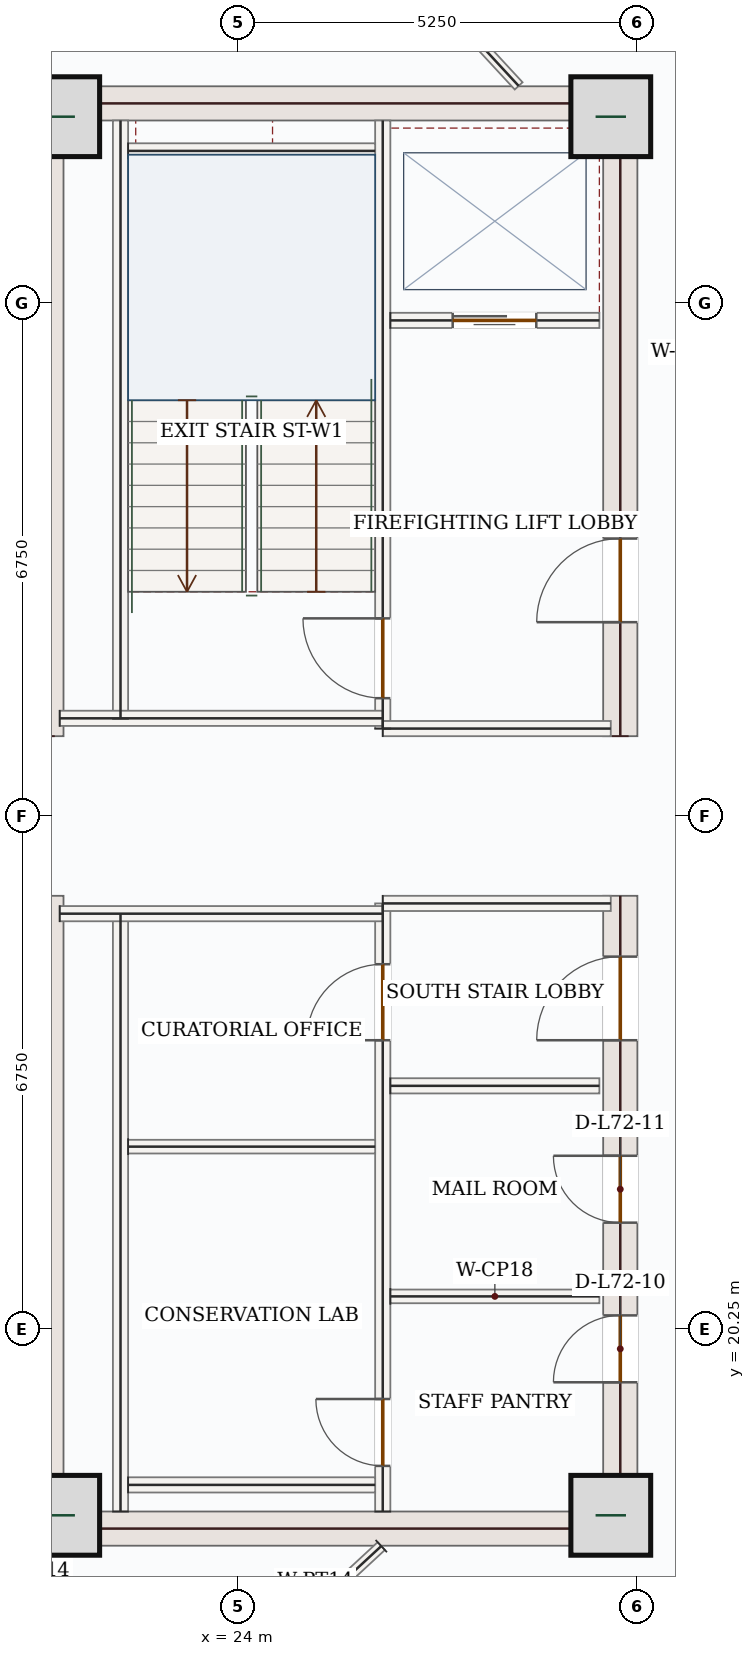
"""IFC4 building model, lengths in metres.
Left out: names, types, materials, properties, quantities, classifications, styles, units other than length and angle.
Written with IfcOpenShell. Run it as: python <this file> out.ifc"""

import sys

from ifc_helpers import new_model, si_unit, direction, frame, frame_2d, origin, origin_2d, place, context, subcontext, project, spatial, rectangle, extrude, source, transform, mapped, element, fill, save


model = new_model("IFC4")
c1 = context("Model", 3, precision=1e-05, world=origin(), true_north=direction((0.0, 1.0)))
c2 = subcontext(c1, "Body", "Model", "MODEL_VIEW")
j1 = project(units=[si_unit("LENGTHUNIT", "METRE"), si_unit("PLANEANGLEUNIT", "RADIAN")], contexts=[c1])
p1 = place(None, origin())
s1 = spatial("IfcSite", under=j1, at=p1, CompositionType="ELEMENT")
p2 = place(p1, origin())
s2 = spatial("IfcBuilding", under=s1, at=p2, CompositionType="ELEMENT")
p3 = place(p2, frame((0.0, 0.0, 299.1)))
s3 = spatial("IfcBuildingStorey", under=s2, at=p3, CompositionType="ELEMENT", Elevation=299.1)
m1 = source(origin(), c2, "Body", "SweptSolid", [
    extrude(rectangle(XDim=8.55, YDim=0.45, at=frame_2d((4.275, 0.0))), origin(), (0.0, 0.0, 1.0), 3.5),
])
for number, where, z_axis, x_axis in (
    (1, (21.475, 17.4, 0.0), (0.0, 0.0, 1.0), (0.0, 1.0, 0.0)),
    (2, (21.475, 28.05, 0.0), (0.0, 0.0, 1.0), (0.0, 1.0, 0.0)),
):
    element("IfcWall", number, at=place(p3, frame(where, z_axis=z_axis, x_axis=x_axis)), inside=s3, PredefinedType="SHEAR", context=c2, shape_type="MappedRepresentation", body=[
        mapped(m1, transform((0.0, 0.0, 0.0), x_axis=(1.0, 0.0, 0.0), y_axis=(0.0, 1.0, 0.0), z_axis=(0.0, 0.0, 1.0), scale=1.0)),
    ])
p4 = place(p3, frame((29.025, 17.4, 0.0), z_axis=(0.0, 0.0, 1.0), x_axis=(0.0, 1.0, 0.0)))
e3 = element("IfcWall", 3, at=p4, inside=s3, PredefinedType="SHEAR", context=c2, shape_type="SweptSolid", body=[
    extrude(rectangle(XDim=8.55, YDim=0.45, at=frame_2d((4.275, 0.0))), origin(), (0.0, 0.0, 1.0), 3.5),
])
p5 = place(p4, frame((6.65, 0.0, 0.0)))
e4 = element("IfcOpeningElement", 4, at=p5, cuts=e3, PredefinedType="OPENING", context=c2, shape_type="SweptSolid", body=[
    extrude(rectangle(XDim=1.1, YDim=2.2, at=frame_2d((0.55, 1.1))), frame((0.0, 0.235, 0.0), z_axis=(0.0, -1.0, 0.0), x_axis=(1.0, 0.0, 0.0)), (0.0, 0.0, 1.0), 0.47),
])
p6 = place(p4, frame((2.15, 0.0, 0.0)))
e5 = element("IfcOpeningElement", 5, at=p6, cuts=e3, PredefinedType="OPENING", context=c2, shape_type="SweptSolid", body=[
    extrude(rectangle(XDim=0.88, YDim=2.1, at=frame_2d((0.44, 1.05))), frame((0.0, 0.235, 0.0), z_axis=(0.0, -1.0, 0.0), x_axis=(1.0, 0.0, 0.0)), (0.0, 0.0, 1.0), 0.47),
])
p7 = place(p4, frame((4.25, 0.0, 0.0)))
e6 = element("IfcOpeningElement", 6, at=p7, cuts=e3, PredefinedType="OPENING", context=c2, shape_type="SweptSolid", body=[
    extrude(rectangle(XDim=0.88, YDim=2.1, at=frame_2d((0.44, 1.05))), frame((0.0, 0.235, 0.0), z_axis=(0.0, -1.0, 0.0), x_axis=(1.0, 0.0, 0.0)), (0.0, 0.0, 1.0), 0.47),
])
p8 = place(p3, frame((29.025, 28.05, 0.0), z_axis=(0.0, 0.0, 1.0), x_axis=(0.0, 1.0, 0.0)))
e7 = element("IfcWall", 7, at=p8, inside=s3, PredefinedType="SHEAR", context=c2, shape_type="SweptSolid", body=[
    extrude(rectangle(XDim=8.55, YDim=0.45, at=frame_2d((4.275, 0.0))), origin(), (0.0, 0.0, 1.0), 3.5),
])
p9 = place(p8, frame((1.5, 0.0, 0.0)))
e8 = element("IfcOpeningElement", 8, at=p9, cuts=e7, PredefinedType="OPENING", context=c2, shape_type="SweptSolid", body=[
    extrude(rectangle(XDim=1.1, YDim=2.2, at=frame_2d((0.55, 1.1))), frame((0.0, 0.235, 0.0), z_axis=(0.0, -1.0, 0.0), x_axis=(1.0, 0.0, 0.0)), (0.0, 0.0, 1.0), 0.47),
])
m2 = source(origin(), c2, "Body", "SweptSolid", [
    extrude(rectangle(XDim=7.1, YDim=0.45, at=frame_2d((3.55, 0.0))), origin(), (0.0, 0.0, 1.0), 3.5),
])
for number, where, z_axis, x_axis in (
    (9, (21.7, 17.625, 0.0), (0.0, 0.0, 1.0), (1.0, 0.0, 0.0)),
    (10, (21.7, 36.375, 0.0), (0.0, 0.0, 1.0), (1.0, 0.0, 0.0)),
):
    element("IfcWall", number, at=place(p3, frame(where, z_axis=z_axis, x_axis=x_axis)), inside=s3, PredefinedType="SHEAR", context=c2, shape_type="MappedRepresentation", body=[
        mapped(m2, transform((0.0, 0.0, 0.0), x_axis=(1.0, 0.0, 0.0), y_axis=(0.0, 1.0, 0.0), z_axis=(0.0, 0.0, 1.0), scale=1.0)),
    ])
m3 = source(origin(), c2, "Body", "SweptSolid", [
    extrude(rectangle(XDim=1.05, YDim=1.05, at=origin_2d()), origin(), (0.0, 0.0, 1.0), 3.75),
])
for number, where, z_axis, x_axis in (
    (11, (21.65, 17.8, 0.0), (0.0, 0.0, 1.0), (1.0, 0.0, 0.0)),
    (12, (28.9, 17.8, 0.0), (0.0, 0.0, 1.0), (1.0, 0.0, 0.0)),
    (13, (21.65, 36.2, 0.0), (0.0, 0.0, 1.0), (1.0, 0.0, 0.0)),
    (14, (28.9, 36.2, 0.0), (0.0, 0.0, 1.0), (1.0, 0.0, 0.0)),
):
    element("IfcColumn", number, at=place(p3, frame(where, z_axis=z_axis, x_axis=x_axis)), inside=s3, PredefinedType="COLUMN", context=c2, shape_type="MappedRepresentation", body=[
        mapped(m3, transform((0.0, 0.0, 0.0), x_axis=(1.0, 0.0, 0.0), y_axis=(0.0, 1.0, 0.0), z_axis=(0.0, 0.0, 1.0), scale=1.0)),
    ])
m4 = source(origin(), c2, "Body", "SweptSolid", [
    extrude(rectangle(XDim=10.274, YDim=0.28, at=frame_2d((5.137, 0.0))), origin(), (0.0, 0.0, 1.0), 3.5),
])
p10 = place(p3, frame((25.992, 10.987, 0.0), z_axis=(0.0, 0.0, 1.0), x_axis=(-0.68643580465, 0.727190405667, 0.0)))
e15 = element("IfcWall", 15, at=p10, inside=s3, PredefinedType="SOLIDWALL", context=c2, shape_type="MappedRepresentation", body=[
    mapped(m4, transform((0.0, 0.0, 0.0), x_axis=(1.0, 0.0, 0.0), y_axis=(0.0, 1.0, 0.0), z_axis=(0.0, 0.0, 1.0), scale=1.0)),
])
p11 = place(p3, frame((18.94, 35.542, 0.0), z_axis=(0.0, 0.0, 1.0), x_axis=(0.712557502542, 0.701613715353, 0.0)))
e16 = element("IfcWall", 16, at=p11, inside=s3, PredefinedType="SOLIDWALL", context=c2, shape_type="SweptSolid", body=[
    extrude(rectangle(XDim=11.69, YDim=0.28, at=frame_2d((5.845, 0.0))), origin(), (0.0, 0.0, 1.0), 3.5),
])
p12 = place(p11, frame((5.095, 0.0, 0.85)))
e17 = element("IfcOpeningElement", 17, at=p12, cuts=e16, PredefinedType="OPENING", context=c2, shape_type="SweptSolid", body=[
    extrude(rectangle(XDim=1.5, YDim=1.5, at=frame_2d((0.75, 0.75))), frame((0.0, 0.15, 0.0), z_axis=(0.0, -1.0, 0.0), x_axis=(1.0, 0.0, 0.0)), (0.0, 0.0, 1.0), 0.3),
])
m5 = source(origin(), c2, "Body", "SweptSolid", [
    extrude(rectangle(XDim=7.87, YDim=0.2, at=frame_2d((3.935, 0.0))), origin(), (0.0, 0.0, 1.0), 3.5),
])
for number, where, z_axis, x_axis in (
    (18, (22.45, 17.85, 0.0), (0.0, 0.0, 1.0), (0.0, 1.0, 0.0)),
    (19, (22.45, 28.28, 0.0), (0.0, 0.0, 1.0), (0.0, 1.0, 0.0)),
):
    element("IfcWall", number, at=place(p3, frame(where, z_axis=z_axis, x_axis=x_axis)), inside=s3, PredefinedType="SOLIDWALL", context=c2, shape_type="MappedRepresentation", body=[
        mapped(m5, transform((0.0, 0.0, 0.0), x_axis=(1.0, 0.0, 0.0), y_axis=(0.0, 1.0, 0.0), z_axis=(0.0, 0.0, 1.0), scale=1.0)),
    ])
p13 = place(p3, frame((25.9, 17.85, 0.0), z_axis=(0.0, 0.0, 1.0), x_axis=(0.0, 1.0, 0.0)))
e20 = element("IfcWall", 20, at=p13, inside=s3, PredefinedType="SOLIDWALL", context=c2, shape_type="SweptSolid", body=[
    extrude(rectangle(XDim=8.0, YDim=0.2, at=frame_2d((4.0, 0.0))), origin(), (0.0, 0.0, 1.0), 3.5),
])
p14 = place(p13, frame((6.2, 0.0, 0.0)))
e21 = element("IfcOpeningElement", 21, at=p14, cuts=e20, PredefinedType="OPENING", context=c2, shape_type="SweptSolid", body=[
    extrude(rectangle(XDim=1.0, YDim=2.15, at=frame_2d((0.5, 1.075))), frame((0.0, 0.11, 0.0), z_axis=(0.0, -1.0, 0.0), x_axis=(1.0, 0.0, 0.0)), (0.0, 0.0, 1.0), 0.22),
])
p15 = place(p13, frame((0.6, 0.0, 0.0)))
e22 = element("IfcOpeningElement", 22, at=p15, cuts=e20, PredefinedType="OPENING", context=c2, shape_type="SweptSolid", body=[
    extrude(rectangle(XDim=0.88, YDim=2.1, at=frame_2d((0.44, 1.05))), frame((0.0, 0.11, 0.0), z_axis=(0.0, -1.0, 0.0), x_axis=(1.0, 0.0, 0.0)), (0.0, 0.0, 1.0), 0.22),
])
p16 = place(p3, frame((25.9, 28.15, 0.0), z_axis=(0.0, 0.0, 1.0), x_axis=(0.0, 1.0, 0.0)))
e23 = element("IfcWall", 23, at=p16, inside=s3, PredefinedType="SOLIDWALL", context=c2, shape_type="SweptSolid", body=[
    extrude(rectangle(XDim=8.0, YDim=0.2, at=frame_2d((4.0, 0.0))), origin(), (0.0, 0.0, 1.0), 3.5),
])
p17 = place(p16, frame((0.4, 0.0, 0.0)))
e24 = element("IfcOpeningElement", 24, at=p17, cuts=e23, PredefinedType="OPENING", context=c2, shape_type="SweptSolid", body=[
    extrude(rectangle(XDim=1.05, YDim=2.15, at=frame_2d((0.525, 1.075))), frame((0.0, 0.11, 0.0), z_axis=(0.0, -1.0, 0.0), x_axis=(1.0, 0.0, 0.0)), (0.0, 0.0, 1.0), 0.22),
])
m6 = source(origin(), c2, "Body", "SweptSolid", [
    extrude(rectangle(XDim=4.25, YDim=0.2, at=frame_2d((2.125, 0.0))), origin(), (0.0, 0.0, 1.0), 3.5),
])
p18 = place(p3, frame((21.65, 25.715, 0.0), z_axis=(0.0, 0.0, 1.0), x_axis=(1.0, 0.0, 0.0)))
e25 = element("IfcWall", 25, at=p18, inside=s3, PredefinedType="SOLIDWALL", context=c2, shape_type="MappedRepresentation", body=[
    mapped(m6, transform((0.0, 0.0, 0.0), x_axis=(1.0, 0.0, 0.0), y_axis=(0.0, 1.0, 0.0), z_axis=(0.0, 0.0, 1.0), scale=1.0)),
])
m7 = source(origin(), c2, "Body", "SweptSolid", [
    extrude(rectangle(XDim=3.0, YDim=0.2, at=frame_2d((1.5, 0.0))), origin(), (0.0, 0.0, 1.0), 3.5),
])
p19 = place(p3, frame((25.9, 25.85, 0.0), z_axis=(0.0, 0.0, 1.0), x_axis=(1.0, 0.0, 0.0)))
e26 = element("IfcWall", 26, at=p19, inside=s3, PredefinedType="SOLIDWALL", context=c2, shape_type="MappedRepresentation", body=[
    mapped(m7, transform((0.0, 0.0, 0.0), x_axis=(1.0, 0.0, 0.0), y_axis=(0.0, 1.0, 0.0), z_axis=(0.0, 0.0, 1.0), scale=1.0)),
])
p20 = place(p3, frame((21.65, 28.285, 0.0), z_axis=(0.0, 0.0, 1.0), x_axis=(1.0, 0.0, 0.0)))
e27 = element("IfcWall", 27, at=p20, inside=s3, PredefinedType="SOLIDWALL", context=c2, shape_type="MappedRepresentation", body=[
    mapped(m6, transform((0.0, 0.0, 0.0), x_axis=(1.0, 0.0, 0.0), y_axis=(0.0, 1.0, 0.0), z_axis=(0.0, 0.0, 1.0), scale=1.0)),
])
p21 = place(p3, frame((25.9, 28.15, 0.0), z_axis=(0.0, 0.0, 1.0), x_axis=(1.0, 0.0, 0.0)))
e28 = element("IfcWall", 28, at=p21, inside=s3, PredefinedType="SOLIDWALL", context=c2, shape_type="MappedRepresentation", body=[
    mapped(m7, transform((0.0, 0.0, 0.0), x_axis=(1.0, 0.0, 0.0), y_axis=(0.0, 1.0, 0.0), z_axis=(0.0, 0.0, 1.0), scale=1.0)),
])
m8 = source(origin(), c2, "Body", "SweptSolid", [
    extrude(rectangle(XDim=3.25, YDim=0.2, at=frame_2d((1.625, 0.0))), origin(), (0.0, 0.0, 1.0), 3.5),
])
for number, where, z_axis, x_axis in (
    (29, (22.55, 35.75, 0.0), (0.0, 0.0, 1.0), (1.0, 0.0, 0.0)),
    (30, (22.55, 18.2, 0.0), (0.0, 0.0, 1.0), (1.0, 0.0, 0.0)),
):
    element("IfcWall", number, at=place(p3, frame(where, z_axis=z_axis, x_axis=x_axis)), inside=s3, PredefinedType="SOLIDWALL", context=c2, shape_type="MappedRepresentation", body=[
        mapped(m8, transform((0.0, 0.0, 0.0), x_axis=(1.0, 0.0, 0.0), y_axis=(0.0, 1.0, 0.0), z_axis=(0.0, 0.0, 1.0), scale=1.0)),
    ])
m9 = source(origin(), c2, "Body", "SweptSolid", [
    extrude(rectangle(XDim=3.25, YDim=0.18, at=frame_2d((1.625, 0.0))), origin(), (0.0, 0.0, 1.0), 3.5),
])
p22 = place(p3, frame((22.55, 22.65, 0.0), z_axis=(0.0, 0.0, 1.0), x_axis=(1.0, 0.0, 0.0)))
e31 = element("IfcWall", 31, at=p22, inside=s3, PredefinedType="PARTITIONING", context=c2, shape_type="MappedRepresentation", body=[
    mapped(m9, transform((0.0, 0.0, 0.0), x_axis=(1.0, 0.0, 0.0), y_axis=(0.0, 1.0, 0.0), z_axis=(0.0, 0.0, 1.0), scale=1.0)),
])
p23 = place(p3, frame((26.0, 33.52, 0.0), z_axis=(0.0, 0.0, 1.0), x_axis=(1.0, 0.0, 0.0)))
e32 = element("IfcWall", 32, at=p23, inside=s3, PredefinedType="SOLIDWALL", context=c2, shape_type="SweptSolid", body=[
    extrude(rectangle(XDim=2.75, YDim=0.2, at=frame_2d((1.375, 0.0))), origin(), (0.0, 0.0, 1.0), 3.5),
])
p24 = place(p23, frame((0.82, 0.0, 0.0)))
e33 = element("IfcOpeningElement", 33, at=p24, cuts=e32, PredefinedType="OPENING", context=c2, shape_type="SweptSolid", body=[
    extrude(rectangle(XDim=1.1, YDim=2.15, at=frame_2d((0.55, 1.075))), frame((0.0, 0.11, 0.0), z_axis=(0.0, -1.0, 0.0), x_axis=(1.0, 0.0, 0.0)), (0.0, 0.0, 1.0), 0.22),
])
m10 = source(origin(), c2, "Body", "SweptSolid", [
    extrude(rectangle(XDim=2.75, YDim=0.2, at=frame_2d((1.375, 0.0))), origin(), (0.0, 0.0, 1.0), 3.5),
])
p25 = place(p3, frame((26.0, 23.45, 0.0), z_axis=(0.0, 0.0, 1.0), x_axis=(1.0, 0.0, 0.0)))
e34 = element("IfcWall", 34, at=p25, inside=s3, PredefinedType="SOLIDWALL", context=c2, shape_type="MappedRepresentation", body=[
    mapped(m10, transform((0.0, 0.0, 0.0), x_axis=(1.0, 0.0, 0.0), y_axis=(0.0, 1.0, 0.0), z_axis=(0.0, 0.0, 1.0), scale=1.0)),
])
m11 = source(origin(), c2, "Body", "SweptSolid", [
    extrude(rectangle(XDim=2.75, YDim=0.18, at=frame_2d((1.375, 0.0))), origin(), (0.0, 0.0, 1.0), 3.5),
])
p26 = place(p3, frame((26.0, 20.68, 0.0), z_axis=(0.0, 0.0, 1.0), x_axis=(1.0, 0.0, 0.0)))
e35 = element("IfcWall", 35, at=p26, inside=s3, PredefinedType="PARTITIONING", context=c2, shape_type="MappedRepresentation", body=[
    mapped(m11, transform((0.0, 0.0, 0.0), x_axis=(1.0, 0.0, 0.0), y_axis=(0.0, 1.0, 0.0), z_axis=(0.0, 0.0, 1.0), scale=1.0)),
])
p27 = place(p3, frame((25.881, 17.395, 0.0), z_axis=(0.0, 0.0, 1.0), x_axis=(-0.734127876216, -0.679011238024, 0.0)))
e36 = element("IfcWall", 36, at=p27, inside=s3, PredefinedType="PARTITIONING", context=c2, shape_type="SweptSolid", body=[
    extrude(rectangle(XDim=4.173, YDim=0.14, at=frame_2d((2.086, 0.0))), origin(), (0.0, 0.0, 1.0), 3.5),
])
p28 = place(p27, frame((2.514, 0.0, 0.0)))
e37 = element("IfcOpeningElement", 37, at=p28, cuts=e36, PredefinedType="OPENING", context=c2, shape_type="SweptSolid", body=[
    extrude(rectangle(XDim=0.95, YDim=2.15, at=frame_2d((0.475, 1.075))), frame((0.0, 0.08, 0.0), z_axis=(0.0, -1.0, 0.0), x_axis=(1.0, 0.0, 0.0)), (0.0, 0.0, 1.0), 0.16),
])
m12 = source(origin(), c2, "Body", "SweptSolid", [
    extrude(rectangle(XDim=0.745, YDim=0.14, at=frame_2d((0.373, 0.0))), origin(), (0.0, 0.0, 1.0), 3.5),
])
p29 = place(p3, frame((21.012, 16.474, 0.0), z_axis=(0.0, 0.0, 1.0), x_axis=(0.734262819455, 0.678865312095, 0.0)))
e38 = element("IfcWall", 38, at=p29, inside=s3, PredefinedType="PARTITIONING", context=c2, shape_type="MappedRepresentation", body=[
    mapped(m12, transform((0.0, 0.0, 0.0), x_axis=(1.0, 0.0, 0.0), y_axis=(0.0, 1.0, 0.0), z_axis=(0.0, 0.0, 1.0), scale=1.0)),
])
m13 = source(origin(), c2, "Body", "SweptSolid", [
    extrude(rectangle(XDim=5.5, YDim=0.14, at=frame_2d((2.75, 0.0))), origin(), (0.0, 0.0, 1.0), 3.5),
])
p30 = place(p3, frame((19.818, 37.015, 0.0), z_axis=(0.0, 0.0, 1.0), x_axis=(0.734137611872, 0.679000711954, 0.0)))
e39 = element("IfcWall", 39, at=p30, inside=s3, PredefinedType="PARTITIONING", context=c2, shape_type="MappedRepresentation", body=[
    mapped(m13, transform((0.0, 0.0, 0.0), x_axis=(1.0, 0.0, 0.0), y_axis=(0.0, 1.0, 0.0), z_axis=(0.0, 0.0, 1.0), scale=1.0)),
])
m14 = source(origin(), c2, "Body", "SweptSolid", [
    extrude(rectangle(XDim=5.238, YDim=0.14, at=frame_2d((2.619, 0.0))), origin(), (0.0, 0.0, 1.0), 3.5),
])
p31 = place(p3, frame((24.132, 40.45, 0.0), z_axis=(0.0, 0.0, 1.0), x_axis=(0.67899802156, -0.734140100197, 0.0)))
e40 = element("IfcWall", 40, at=p31, inside=s3, PredefinedType="PARTITIONING", context=c2, shape_type="MappedRepresentation", body=[
    mapped(m14, transform((0.0, 0.0, 0.0), x_axis=(1.0, 0.0, 0.0), y_axis=(0.0, 1.0, 0.0), z_axis=(0.0, 0.0, 1.0), scale=1.0)),
])
m15 = source(origin(), c2, "Body", "SweptSolid", [
    extrude(rectangle(XDim=1.05, YDim=2.15, at=frame_2d((0.525, 1.075))), frame((0.0, 0.025, 0.0), z_axis=(0.0, -1.0, 0.0), x_axis=(1.0, 0.0, 0.0)), (0.0, 0.0, 1.0), 0.05),
])
p32 = place(p17, origin())
e41 = element("IfcDoor", 41, at=p32, inside=s3, OperationType="SINGLE_SWING_RIGHT", PredefinedType="DOOR", context=c2, shape_type="MappedRepresentation", body=[
    mapped(m15, transform((0.0, 0.0, 0.0), x_axis=(1.0, 0.0, 0.0), y_axis=(0.0, 1.0, 0.0), z_axis=(0.0, 0.0, 1.0), scale=1.0)),
])
fill(e24, e41)
m16 = source(origin(), c2, "Body", "SweptSolid", [
    extrude(rectangle(XDim=1.0, YDim=2.15, at=frame_2d((0.5, 1.075))), frame((0.0, 0.025, 0.0), z_axis=(0.0, -1.0, 0.0), x_axis=(1.0, 0.0, 0.0)), (0.0, 0.0, 1.0), 0.05),
])
p33 = place(p14, origin())
e42 = element("IfcDoor", 42, at=p33, inside=s3, OperationType="SINGLE_SWING_LEFT", PredefinedType="DOOR", context=c2, shape_type="MappedRepresentation", body=[
    mapped(m16, transform((0.0, 0.0, 0.0), x_axis=(1.0, 0.0, 0.0), y_axis=(0.0, 1.0, 0.0), z_axis=(0.0, 0.0, 1.0), scale=1.0)),
])
fill(e21, e42)
m17 = source(origin(), c2, "Body", "SweptSolid", [
    extrude(rectangle(XDim=0.88, YDim=2.1, at=frame_2d((0.44, 1.05))), frame((0.0, 0.025, 0.0), z_axis=(0.0, -1.0, 0.0), x_axis=(1.0, 0.0, 0.0)), (0.0, 0.0, 1.0), 0.05),
])
p34 = place(p15, origin())
e43 = element("IfcDoor", 43, at=p34, inside=s3, OperationType="SINGLE_SWING_RIGHT", PredefinedType="DOOR", context=c2, shape_type="MappedRepresentation", body=[
    mapped(m17, transform((0.0, 0.0, 0.0), x_axis=(1.0, 0.0, 0.0), y_axis=(0.0, 1.0, 0.0), z_axis=(0.0, 0.0, 1.0), scale=1.0)),
])
fill(e22, e43)
m18 = source(origin(), c2, "Body", "SweptSolid", [
    extrude(rectangle(XDim=1.1, YDim=2.15, at=frame_2d((0.55, 1.075))), frame((0.0, 0.025, 0.0), z_axis=(0.0, -1.0, 0.0), x_axis=(1.0, 0.0, 0.0)), (0.0, 0.0, 1.0), 0.05),
])
p35 = place(p24, origin())
e44 = element("IfcDoor", 44, at=p35, inside=s3, OperationType="DOUBLE_DOOR_SLIDING", PredefinedType="DOOR", context=c2, shape_type="MappedRepresentation", body=[
    mapped(m18, transform((0.0, 0.0, 0.0), x_axis=(1.0, 0.0, 0.0), y_axis=(0.0, 1.0, 0.0), z_axis=(0.0, 0.0, 1.0), scale=1.0)),
])
fill(e33, e44)
m19 = source(origin(), c2, "Body", "SweptSolid", [
    extrude(rectangle(XDim=1.1, YDim=2.2, at=frame_2d((0.55, 1.1))), frame((0.0, 0.025, 0.0), z_axis=(0.0, -1.0, 0.0), x_axis=(1.0, 0.0, 0.0)), (0.0, 0.0, 1.0), 0.05),
])
p36 = place(p9, origin())
e45 = element("IfcDoor", 45, at=p36, inside=s3, OperationType="SINGLE_SWING_LEFT", PredefinedType="DOOR", context=c2, shape_type="MappedRepresentation", body=[
    mapped(m19, transform((0.0, 0.0, 0.0), x_axis=(1.0, 0.0, 0.0), y_axis=(0.0, 1.0, 0.0), z_axis=(0.0, 0.0, 1.0), scale=1.0)),
])
fill(e8, e45)
p37 = place(p5, origin())
e46 = element("IfcDoor", 46, at=p37, inside=s3, OperationType="SINGLE_SWING_LEFT", PredefinedType="DOOR", context=c2, shape_type="MappedRepresentation", body=[
    mapped(m19, transform((0.0, 0.0, 0.0), x_axis=(1.0, 0.0, 0.0), y_axis=(0.0, 1.0, 0.0), z_axis=(0.0, 0.0, 1.0), scale=1.0)),
])
fill(e4, e46)
p38 = place(p6, origin())
e47 = element("IfcDoor", 47, at=p38, inside=s3, OperationType="SINGLE_SWING_LEFT", PredefinedType="DOOR", context=c2, shape_type="MappedRepresentation", body=[
    mapped(m17, transform((0.0, 0.0, 0.0), x_axis=(1.0, 0.0, 0.0), y_axis=(0.0, 1.0, 0.0), z_axis=(0.0, 0.0, 1.0), scale=1.0)),
])
fill(e5, e47)
p39 = place(p7, origin())
e48 = element("IfcDoor", 48, at=p39, inside=s3, OperationType="SINGLE_SWING_RIGHT", PredefinedType="DOOR", context=c2, shape_type="MappedRepresentation", body=[
    mapped(m17, transform((0.0, 0.0, 0.0), x_axis=(1.0, 0.0, 0.0), y_axis=(0.0, 1.0, 0.0), z_axis=(0.0, 0.0, 1.0), scale=1.0)),
])
fill(e6, e48)
save(model, sys.argv[1])
